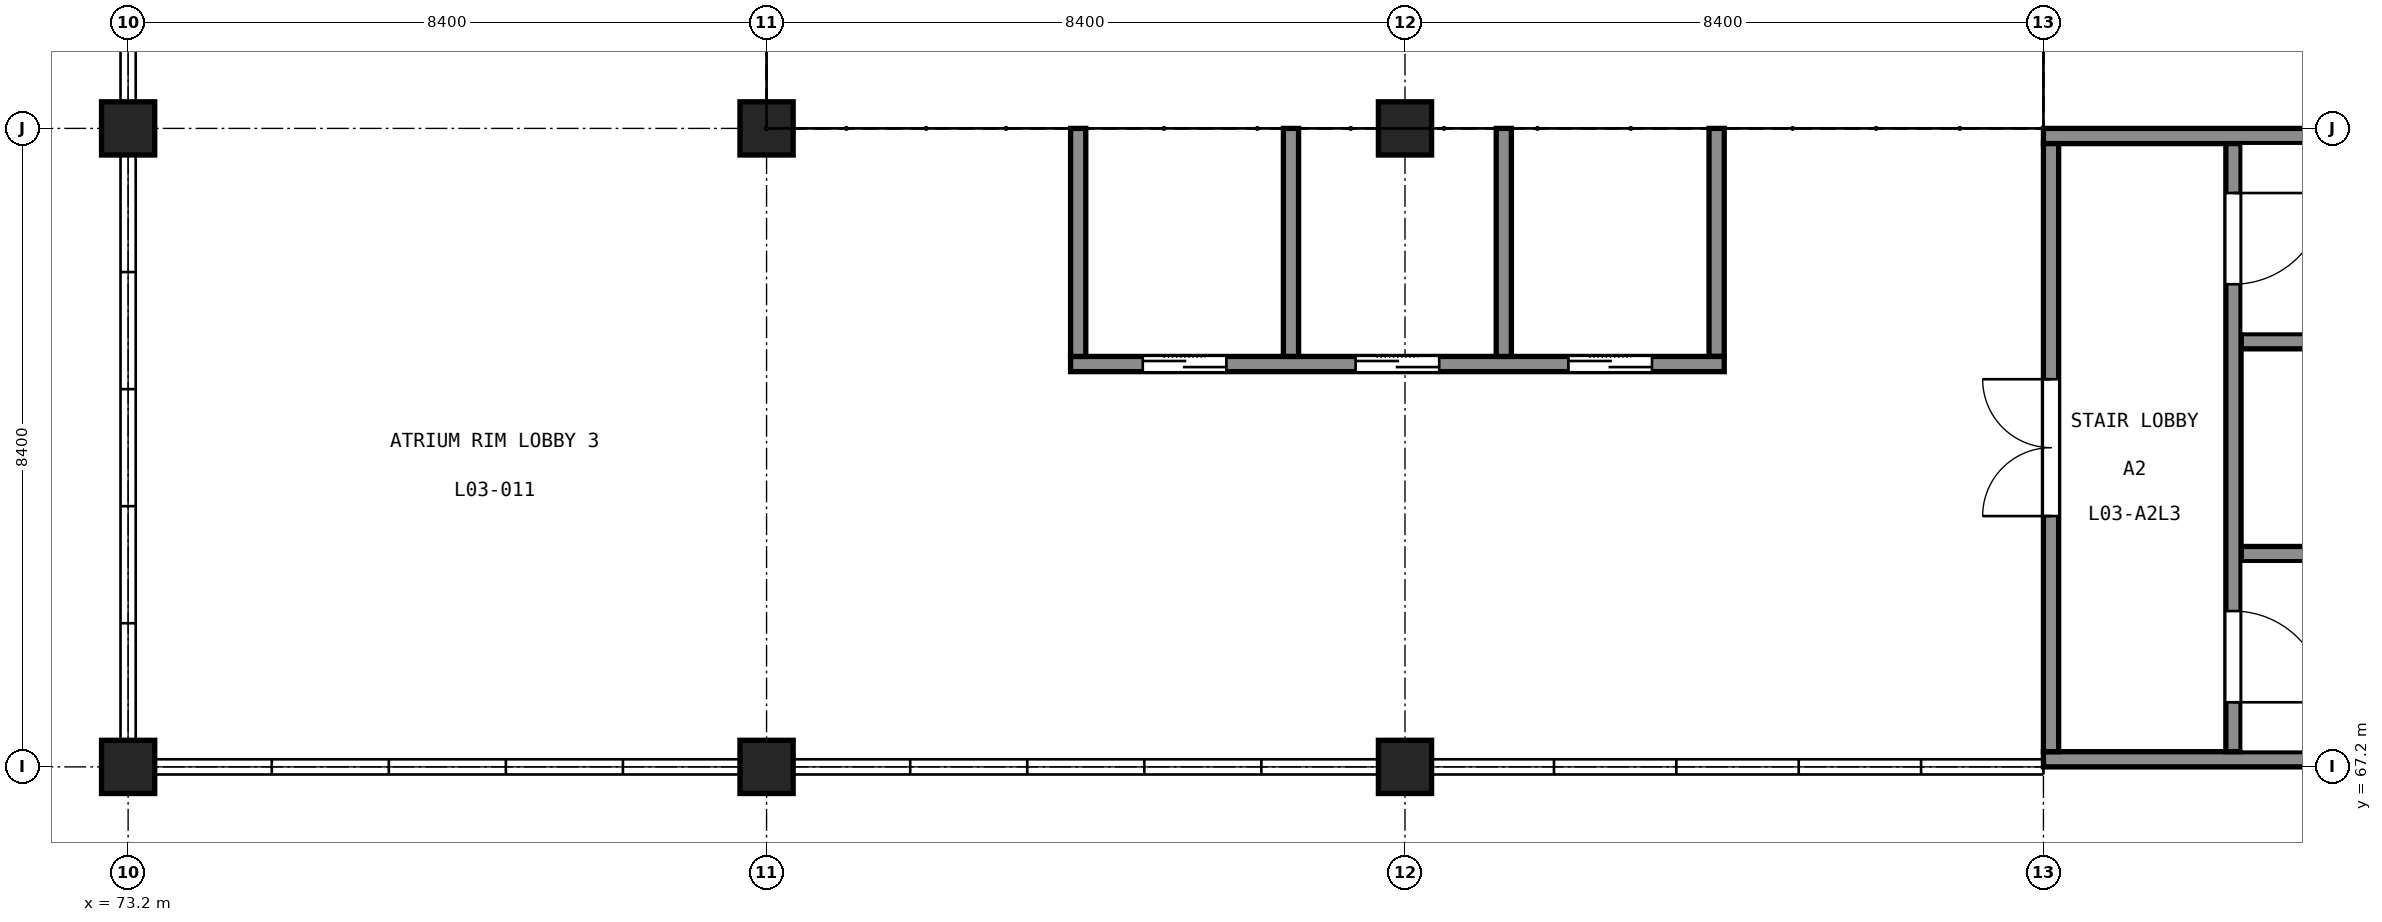
"""IFC4 building model, lengths in metres.
Left out: names, types, materials, properties, quantities, classifications, styles, units other than length and angle.
Written with IfcOpenShell. Run it as: python <this file> out.ifc"""

import sys

from ifc_helpers import new_model, si_unit, direction, frame, frame_2d, origin, origin_2d, place, context, subcontext, project, spatial, rectangle, extrude, element, fill, save


model = new_model("IFC4")
c1 = context("Model", 3, precision=1e-05, world=origin(), true_north=direction((0.0, 1.0)))
c2 = subcontext(c1, "Body", "Model", "MODEL_VIEW")
j1 = project(units=[si_unit("LENGTHUNIT", "METRE"), si_unit("PLANEANGLEUNIT", "RADIAN")], contexts=[c1])
p1 = place(None, origin())
s1 = spatial("IfcSite", under=j1, at=p1, CompositionType="ELEMENT")
p2 = place(p1, origin())
s2 = spatial("IfcBuilding", under=s1, at=p2, CompositionType="ELEMENT")
p3 = place(p2, frame((0.0, 0.0, 20.0)))
s3 = spatial("IfcBuildingStorey", under=s2, at=p3, CompositionType="ELEMENT", Elevation=20.0)
for number, where, z_axis, x_axis in (
    (1, (98.4, 67.3, 0.0), (0.0, 0.0, 1.0), (1.0, 0.0, 0.0)),
    (2, (98.4, 75.5, 0.0), (0.0, 0.0, 1.0), (1.0, 0.0, 0.0)),
):
    element("IfcWall", number, at=place(p3, frame(where, z_axis=z_axis, x_axis=x_axis)), inside=s3, PredefinedType="SHEAR", context=c2, shape_type="SweptSolid", body=[
        extrude(rectangle(XDim=8.4, YDim=0.2, at=frame_2d((4.2, 0.0))), origin(), (0.0, 0.0, 1.0), 5.0),
    ])
p4 = place(p3, frame((98.5, 67.4, 0.0), z_axis=(0.0, 0.0, 1.0), x_axis=(0.0, 1.0, 0.0)))
e3 = element("IfcWall", 3, at=p4, inside=s3, PredefinedType="SHEAR", context=c2, shape_type="SweptSolid", body=[
    extrude(rectangle(XDim=8.0, YDim=0.2, at=frame_2d((4.0, 0.0))), origin(), (0.0, 0.0, 1.0), 5.0),
])
p5 = place(p4, frame((3.1, 0.0, 0.0)))
e4 = element("IfcOpeningElement", 4, at=p5, cuts=e3, PredefinedType="OPENING", context=c2, shape_type="SweptSolid", body=[
    extrude(rectangle(XDim=1.8, YDim=2.1, at=frame_2d((0.9, 1.05))), frame((0.0, 0.11, 0.0), z_axis=(0.0, -1.0, 0.0), x_axis=(1.0, 0.0, 0.0)), (0.0, 0.0, 1.0), 0.22),
])
p6 = place(p3, frame((100.9, 67.4, 0.0), z_axis=(0.0, 0.0, 1.0), x_axis=(0.0, 1.0, 0.0)))
e5 = element("IfcWall", 5, at=p6, inside=s3, PredefinedType="SHEAR", context=c2, shape_type="SweptSolid", body=[
    extrude(rectangle(XDim=8.0, YDim=0.2, at=frame_2d((4.0, 0.0))), origin(), (0.0, 0.0, 1.0), 5.0),
])
p7 = place(p6, frame((0.65, 0.0, 0.0)))
e6 = element("IfcOpeningElement", 6, at=p7, cuts=e5, PredefinedType="OPENING", context=c2, shape_type="SweptSolid", body=[
    extrude(rectangle(XDim=1.2, YDim=2.1, at=frame_2d((0.6, 1.05))), frame((0.0, 0.11, 0.0), z_axis=(0.0, -1.0, 0.0), x_axis=(1.0, 0.0, 0.0)), (0.0, 0.0, 1.0), 0.22),
])
p8 = place(p6, frame((6.15, 0.0, 0.0)))
e7 = element("IfcOpeningElement", 7, at=p8, cuts=e5, PredefinedType="OPENING", context=c2, shape_type="SweptSolid", body=[
    extrude(rectangle(XDim=1.2, YDim=2.1, at=frame_2d((0.6, 1.05))), frame((0.0, 0.11, 0.0), z_axis=(0.0, -1.0, 0.0), x_axis=(1.0, 0.0, 0.0)), (0.0, 0.0, 1.0), 0.22),
])
for number, where, z_axis, x_axis in (
    (8, (101.0, 70.0, 0.0), (0.0, 0.0, 1.0), (1.0, 0.0, 0.0)),
    (9, (101.0, 72.8, 0.0), (0.0, 0.0, 1.0), (1.0, 0.0, 0.0)),
):
    element("IfcWall", number, at=place(p3, frame(where, z_axis=z_axis, x_axis=x_axis)), inside=s3, PredefinedType="SHEAR", context=c2, shape_type="SweptSolid", body=[
        extrude(rectangle(XDim=5.6, YDim=0.2, at=frame_2d((2.8, 0.0))), origin(), (0.0, 0.0, 1.0), 5.0),
    ])
p9 = place(p3, frame((85.6, 72.5, 0.0), z_axis=(0.0, 0.0, 1.0), x_axis=(1.0, 0.0, 0.0)))
e10 = element("IfcWall", 10, at=p9, inside=s3, PredefinedType="SHEAR", context=c2, shape_type="SweptSolid", body=[
    extrude(rectangle(XDim=8.6, YDim=0.2, at=frame_2d((4.3, 0.0))), origin(), (0.0, 0.0, 1.0), 5.0),
])
p10 = place(p9, frame((0.95, 0.0, 0.0)))
e11 = element("IfcOpeningElement", 11, at=p10, cuts=e10, PredefinedType="OPENING", context=c2, shape_type="SweptSolid", body=[
    extrude(rectangle(XDim=1.1, YDim=2.1, at=frame_2d((0.55, 1.05))), frame((0.0, 0.11, 0.0), z_axis=(0.0, -1.0, 0.0), x_axis=(1.0, 0.0, 0.0)), (0.0, 0.0, 1.0), 0.22),
])
p11 = place(p9, frame((3.75, 0.0, 0.0)))
e12 = element("IfcOpeningElement", 12, at=p11, cuts=e10, PredefinedType="OPENING", context=c2, shape_type="SweptSolid", body=[
    extrude(rectangle(XDim=1.1, YDim=2.1, at=frame_2d((0.55, 1.05))), frame((0.0, 0.11, 0.0), z_axis=(0.0, -1.0, 0.0), x_axis=(1.0, 0.0, 0.0)), (0.0, 0.0, 1.0), 0.22),
])
p12 = place(p9, frame((6.55, 0.0, 0.0)))
e13 = element("IfcOpeningElement", 13, at=p12, cuts=e10, PredefinedType="OPENING", context=c2, shape_type="SweptSolid", body=[
    extrude(rectangle(XDim=1.1, YDim=2.1, at=frame_2d((0.55, 1.05))), frame((0.0, 0.11, 0.0), z_axis=(0.0, -1.0, 0.0), x_axis=(1.0, 0.0, 0.0)), (0.0, 0.0, 1.0), 0.22),
])
for number, where, z_axis, x_axis in (
    (14, (85.7, 72.6, 0.0), (0.0, 0.0, 1.0), (0.0, 1.0, 0.0)),
    (15, (94.1, 72.6, 0.0), (0.0, 0.0, 1.0), (0.0, 1.0, 0.0)),
    (16, (88.5, 72.6, 0.0), (0.0, 0.0, 1.0), (0.0, 1.0, 0.0)),
    (17, (91.3, 72.6, 0.0), (0.0, 0.0, 1.0), (0.0, 1.0, 0.0)),
):
    element("IfcWall", number, at=place(p3, frame(where, z_axis=z_axis, x_axis=x_axis)), inside=s3, PredefinedType="SHEAR", context=c2, shape_type="SweptSolid", body=[
        extrude(rectangle(XDim=3.0, YDim=0.2, at=frame_2d((1.5, 0.0))), origin(), (0.0, 0.0, 1.0), 5.0),
    ])
for number, where, z_axis, x_axis in (
    (18, (73.2, 67.2, 0.0), (0.0, 0.0, 1.0), (1.0, 0.0, 0.0)),
    (19, (73.2, 75.6, 0.0), (0.0, 0.0, 1.0), (1.0, 0.0, 0.0)),
    (20, (81.6, 67.2, 0.0), (0.0, 0.0, 1.0), (1.0, 0.0, 0.0)),
    (21, (81.6, 75.6, 0.0), (0.0, 0.0, 1.0), (1.0, 0.0, 0.0)),
    (22, (90.0, 67.2, 0.0), (0.0, 0.0, 1.0), (1.0, 0.0, 0.0)),
    (23, (90.0, 75.6, 0.0), (0.0, 0.0, 1.0), (1.0, 0.0, 0.0)),
):
    element("IfcColumn", number, at=place(p3, frame(where, z_axis=z_axis, x_axis=x_axis)), inside=s3, PredefinedType="COLUMN", context=c2, shape_type="SweptSolid", body=[
        extrude(rectangle(XDim=0.7, YDim=0.7, at=origin_2d()), origin(), (0.0, 0.0, 1.0), 5.0),
    ])
p13 = place(p5, origin())
e24 = element("IfcDoor", 24, at=p13, inside=s3, OperationType="DOUBLE_DOOR_SINGLE_SWING", PredefinedType="DOOR", context=c2, shape_type="SweptSolid", body=[
    extrude(rectangle(XDim=1.8, YDim=2.1, at=frame_2d((0.9, 1.05))), frame((0.0, 0.025, 0.0), z_axis=(0.0, -1.0, 0.0), x_axis=(1.0, 0.0, 0.0)), (0.0, 0.0, 1.0), 0.05),
])
fill(e4, e24)
p14 = place(p7, origin())
e25 = element("IfcDoor", 25, at=p14, inside=s3, OperationType="SINGLE_SWING_LEFT", PredefinedType="DOOR", context=c2, shape_type="SweptSolid", body=[
    extrude(rectangle(XDim=1.2, YDim=2.1, at=frame_2d((0.6, 1.05))), frame((0.0, 0.025, 0.0), z_axis=(0.0, -1.0, 0.0), x_axis=(1.0, 0.0, 0.0)), (0.0, 0.0, 1.0), 0.05),
])
fill(e6, e25)
p15 = place(p8, origin())
e26 = element("IfcDoor", 26, at=p15, inside=s3, OperationType="SINGLE_SWING_RIGHT", PredefinedType="DOOR", context=c2, shape_type="SweptSolid", body=[
    extrude(rectangle(XDim=1.2, YDim=2.1, at=frame_2d((0.6, 1.05))), frame((0.0, 0.025, 0.0), z_axis=(0.0, -1.0, 0.0), x_axis=(1.0, 0.0, 0.0)), (0.0, 0.0, 1.0), 0.05),
])
fill(e7, e26)
p16 = place(p10, origin())
e27 = element("IfcDoor", 27, at=p16, inside=s3, OperationType="DOUBLE_DOOR_SLIDING", PredefinedType="DOOR", context=c2, shape_type="SweptSolid", body=[
    extrude(rectangle(XDim=1.1, YDim=2.1, at=frame_2d((0.55, 1.05))), frame((0.0, 0.025, 0.0), z_axis=(0.0, -1.0, 0.0), x_axis=(1.0, 0.0, 0.0)), (0.0, 0.0, 1.0), 0.05),
])
fill(e11, e27)
p17 = place(p11, origin())
e28 = element("IfcDoor", 28, at=p17, inside=s3, OperationType="DOUBLE_DOOR_SLIDING", PredefinedType="DOOR", context=c2, shape_type="SweptSolid", body=[
    extrude(rectangle(XDim=1.1, YDim=2.1, at=frame_2d((0.55, 1.05))), frame((0.0, 0.025, 0.0), z_axis=(0.0, -1.0, 0.0), x_axis=(1.0, 0.0, 0.0)), (0.0, 0.0, 1.0), 0.05),
])
fill(e12, e28)
p18 = place(p12, origin())
e29 = element("IfcDoor", 29, at=p18, inside=s3, OperationType="DOUBLE_DOOR_SLIDING", PredefinedType="DOOR", context=c2, shape_type="SweptSolid", body=[
    extrude(rectangle(XDim=1.1, YDim=2.1, at=frame_2d((0.55, 1.05))), frame((0.0, 0.025, 0.0), z_axis=(0.0, -1.0, 0.0), x_axis=(1.0, 0.0, 0.0)), (0.0, 0.0, 1.0), 0.05),
])
fill(e13, e29)
save(model, sys.argv[1])
